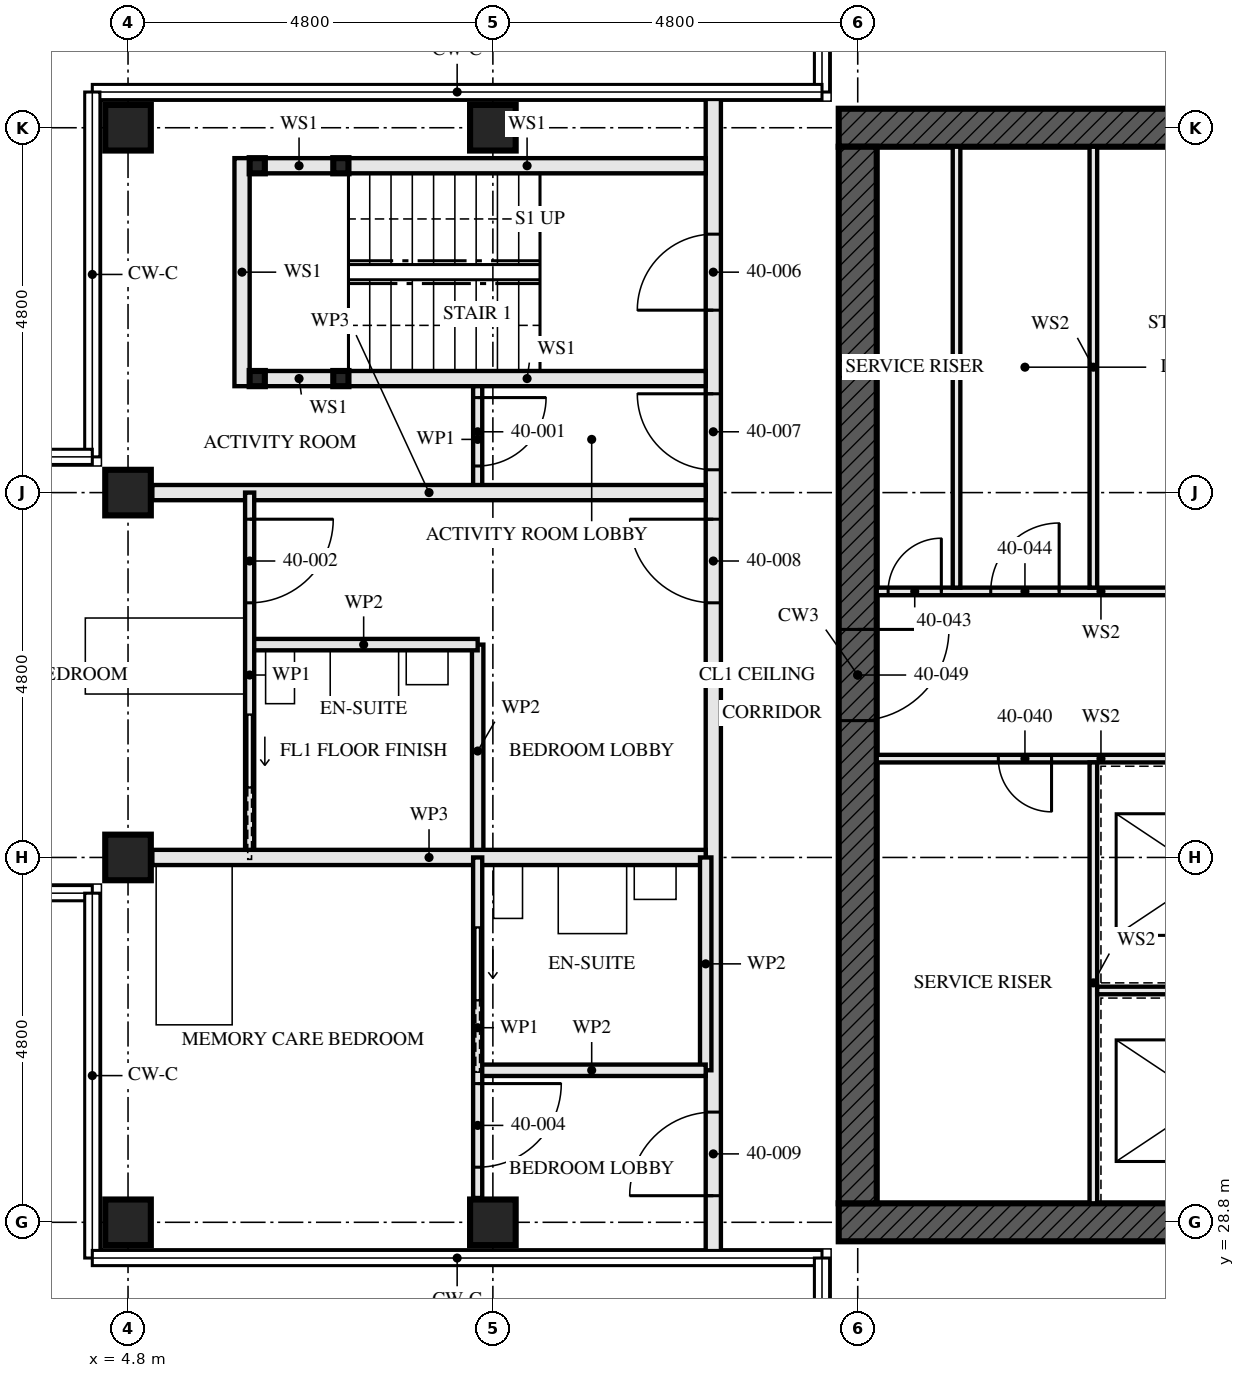
"""IFC4 building model, lengths in metres.
Left out: names, types, materials, properties, quantities, classifications, styles, units other than length and angle.
Written with IfcOpenShell. Run it as: python <this file> out.ifc"""

import sys

from ifc_helpers import new_model, si_unit, direction, frame, frame_2d, origin, origin_2d, place, context, subcontext, project, spatial, rectangle, hollow_rectangle, extrude, element, fill, save


model = new_model("IFC4")
c1 = context("Model", 3, precision=1e-05, world=origin(), true_north=direction((0.0, 1.0)))
c2 = subcontext(c1, "Body", "Model", "MODEL_VIEW")
j1 = project(units=[si_unit("LENGTHUNIT", "METRE"), si_unit("PLANEANGLEUNIT", "RADIAN")], contexts=[c1])
p1 = place(None, origin())
s1 = spatial("IfcSite", under=j1, at=p1, CompositionType="ELEMENT")
p2 = place(p1, origin())
s2 = spatial("IfcBuilding", under=s1, at=p2, CompositionType="ELEMENT")
p3 = place(p2, frame((0.0, 0.0, 148.0)))
s3 = spatial("IfcBuildingStorey", under=s2, at=p3, CompositionType="ELEMENT", Elevation=148.0)
for number, where, z_axis, x_axis in (
    (1, (4.8, 28.8, 0.0), (0.0, 0.0, 1.0), (0.0, 1.0, 0.0)),
    (2, (4.8, 33.6, 0.0), (0.0, 0.0, 1.0), (0.0, 1.0, 0.0)),
    (3, (4.8, 38.4, 0.0), (0.0, 0.0, 1.0), (0.0, 1.0, 0.0)),
    (4, (4.8, 43.2, 0.0), (0.0, 0.0, 1.0), (0.0, 1.0, 0.0)),
    (5, (9.6, 28.8, 0.0), (0.0, 0.0, 1.0), (0.0, 1.0, 0.0)),
    (6, (9.6, 43.2, 0.0), (0.0, 0.0, 1.0), (0.0, 1.0, 0.0)),
):
    element("IfcColumn", number, at=place(p3, frame(where, z_axis=z_axis, x_axis=x_axis)), inside=s3, PredefinedType="COLUMN", context=c2, shape_type="SweptSolid", body=[
        extrude(hollow_rectangle(XDim=0.6, YDim=0.6, WallThickness=0.08, at=origin_2d()), origin(), (0.0, 0.0, 1.0), 3.5),
    ])
p4 = place(p3, frame((14.15, 28.8, -0.17), z_axis=(0.0, 0.0, 1.0), x_axis=(1.0, 0.0, 0.0)))
e7 = element("IfcWall", 7, at=p4, inside=s3, PredefinedType="SHEAR", context=c2, shape_type="SweptSolid", body=[
    extrude(rectangle(XDim=14.9, YDim=0.5, at=frame_2d((7.45, 0.0))), origin(), (0.0, 0.0, 1.0), 3.5),
])
p5 = place(p4, frame((6.85, 0.0, 0.17)))
e8 = element("IfcOpeningElement", 8, at=p5, cuts=e7, PredefinedType="OPENING", context=c2, shape_type="SweptSolid", body=[
    extrude(rectangle(XDim=1.2, YDim=2.1, at=frame_2d((0.6, 1.05))), frame((0.0, 0.26, 0.0), z_axis=(0.0, -1.0, 0.0), x_axis=(1.0, 0.0, 0.0)), (0.0, 0.0, 1.0), 0.521),
])
p6 = place(p3, frame((29.05, 43.2, -0.17), z_axis=(0.0, 0.0, 1.0), x_axis=(-1.0, 0.0, 0.0)))
e9 = element("IfcWall", 9, at=p6, inside=s3, PredefinedType="SHEAR", context=c2, shape_type="SweptSolid", body=[
    extrude(rectangle(XDim=14.9, YDim=0.5, at=frame_2d((7.45, 0.0))), origin(), (0.0, 0.0, 1.0), 3.5),
])
p7 = place(p6, frame((6.85, 0.0, 0.17)))
e10 = element("IfcOpeningElement", 10, at=p7, cuts=e9, PredefinedType="OPENING", context=c2, shape_type="SweptSolid", body=[
    extrude(rectangle(XDim=1.2, YDim=2.1, at=frame_2d((0.6, 1.05))), frame((0.0, 0.26, 0.0), z_axis=(0.0, -1.0, 0.0), x_axis=(1.0, 0.0, 0.0)), (0.0, 0.0, 1.0), 0.521),
])
p8 = place(p3, frame((14.4, 42.95, -0.17), z_axis=(0.0, 0.0, 1.0), x_axis=(0.0, -1.0, 0.0)))
e11 = element("IfcWall", 11, at=p8, inside=s3, PredefinedType="SHEAR", context=c2, shape_type="SweptSolid", body=[
    extrude(rectangle(XDim=13.9, YDim=0.5, at=frame_2d((6.95, 0.0))), origin(), (0.0, 0.0, 1.0), 3.5),
])
p9 = place(p8, frame((6.35, 0.0, 0.17)))
e12 = element("IfcOpeningElement", 12, at=p9, cuts=e11, PredefinedType="OPENING", context=c2, shape_type="SweptSolid", body=[
    extrude(rectangle(XDim=1.2, YDim=2.1, at=frame_2d((0.6, 1.05))), frame((0.0, 0.26, 0.0), z_axis=(0.0, -1.0, 0.0), x_axis=(1.0, 0.0, 0.0)), (0.0, 0.0, 1.0), 0.521),
])
for number, where, z_axis, x_axis in (
    (13, (6.5, 42.7, 0.0), (0.0, 0.0, 1.0), (1.0, 0.0, 0.0)),
    (14, (6.5, 39.9, 0.0), (0.0, 0.0, 1.0), (1.0, 0.0, 0.0)),
    (15, (7.6, 42.7, 0.0), (0.0, 0.0, 1.0), (1.0, 0.0, 0.0)),
    (16, (7.6, 39.9, 0.0), (0.0, 0.0, 1.0), (1.0, 0.0, 0.0)),
):
    element("IfcColumn", number, at=place(p3, frame(where, z_axis=z_axis, x_axis=x_axis)), inside=s3, PredefinedType="COLUMN", context=c2, shape_type="SweptSolid", body=[
        extrude(hollow_rectangle(XDim=0.2, YDim=0.2, WallThickness=0.008, at=origin_2d()), origin(), (0.0, 0.0, 1.0), 3.33),
    ])
p10 = place(p3, frame((6.6, 42.7, 0.0), z_axis=(0.0, 0.0, 1.0), x_axis=(1.0, 0.0, 0.0)))
e17 = element("IfcWall", 17, at=p10, inside=s3, PredefinedType="SOLIDWALL", context=c2, shape_type="SweptSolid", body=[
    extrude(rectangle(XDim=0.9, YDim=0.2, at=frame_2d((0.45, 0.0))), origin(), (0.0, 0.0, 1.0), 2.99),
])
p11 = place(p3, frame((7.7, 42.7, 0.0), z_axis=(0.0, 0.0, 1.0), x_axis=(1.0, 0.0, 0.0)))
e18 = element("IfcWall", 18, at=p11, inside=s3, PredefinedType="SOLIDWALL", context=c2, shape_type="SweptSolid", body=[
    extrude(rectangle(XDim=4.7, YDim=0.2, at=frame_2d((2.35, 0.0))), origin(), (0.0, 0.0, 1.0), 2.99),
])
p12 = place(p3, frame((6.6, 39.9, 0.0), z_axis=(0.0, 0.0, 1.0), x_axis=(1.0, 0.0, 0.0)))
e19 = element("IfcWall", 19, at=p12, inside=s3, PredefinedType="SOLIDWALL", context=c2, shape_type="SweptSolid", body=[
    extrude(rectangle(XDim=0.9, YDim=0.2, at=frame_2d((0.45, 0.0))), origin(), (0.0, 0.0, 1.0), 2.99),
])
p13 = place(p3, frame((7.7, 39.9, 0.0), z_axis=(0.0, 0.0, 1.0), x_axis=(1.0, 0.0, 0.0)))
e20 = element("IfcWall", 20, at=p13, inside=s3, PredefinedType="SOLIDWALL", context=c2, shape_type="SweptSolid", body=[
    extrude(rectangle(XDim=4.7, YDim=0.2, at=frame_2d((2.35, 0.0))), origin(), (0.0, 0.0, 1.0), 2.99),
])
p14 = place(p3, frame((6.3, 42.8, 0.0), z_axis=(0.0, 0.0, 1.0), x_axis=(0.0, -1.0, 0.0)))
e21 = element("IfcWall", 21, at=p14, inside=s3, PredefinedType="SOLIDWALL", context=c2, shape_type="SweptSolid", body=[
    extrude(rectangle(XDim=3.0, YDim=0.2, at=frame_2d((1.5, 0.0))), origin(), (0.0, 0.0, 1.0), 3.33),
])
p15 = place(p3, frame((9.4, 39.8, 0.0), z_axis=(0.0, 0.0, 1.0), x_axis=(0.0, -1.0, 0.0)))
e22 = element("IfcWall", 22, at=p15, inside=s3, PredefinedType="PARTITIONING", context=c2, shape_type="SweptSolid", body=[
    extrude(rectangle(XDim=1.4, YDim=0.12, at=frame_2d((0.7, 0.0))), origin(), (0.0, 0.0, 1.0), 3.33),
])
p16 = place(p15, frame((0.15, 0.0, 0.0)))
e23 = element("IfcOpeningElement", 23, at=p16, cuts=e22, PredefinedType="OPENING", context=c2, shape_type="SweptSolid", body=[
    extrude(rectangle(XDim=0.9, YDim=2.1, at=frame_2d((0.45, 1.05))), frame((0.0, 0.071, 0.0), z_axis=(0.0, -1.0, 0.0), x_axis=(1.0, 0.0, 0.0)), (0.0, 0.0, 1.0), 0.141),
])
p17 = place(p3, frame((5.12, 38.4, 0.0), z_axis=(0.0, 0.0, 1.0), x_axis=(1.0, 0.0, 0.0)))
e24 = element("IfcWall", 24, at=p17, inside=s3, PredefinedType="PARTITIONING", context=c2, shape_type="SweptSolid", body=[
    extrude(rectangle(XDim=7.28, YDim=0.2, at=frame_2d((3.64, 0.0))), origin(), (0.0, 0.0, 1.0), 2.55),
])
p18 = place(p3, frame((6.4, 36.4, 0.0), z_axis=(0.0, 0.0, 1.0), x_axis=(1.0, 0.0, 0.0)))
e25 = element("IfcWall", 25, at=p18, inside=s3, PredefinedType="PARTITIONING", context=c2, shape_type="SweptSolid", body=[
    extrude(rectangle(XDim=3.0, YDim=0.15, at=frame_2d((1.5, 0.0))), origin(), (0.0, 0.0, 1.0), 3.33),
])
p19 = place(p3, frame((9.4, 36.4, 0.0), z_axis=(0.0, 0.0, 1.0), x_axis=(0.0, -1.0, 0.0)))
e26 = element("IfcWall", 26, at=p19, inside=s3, PredefinedType="PARTITIONING", context=c2, shape_type="SweptSolid", body=[
    extrude(rectangle(XDim=2.8, YDim=0.15, at=frame_2d((1.4, 0.0))), origin(), (0.0, 0.0, 1.0), 3.33),
])
p20 = place(p3, frame((6.4, 38.4, 0.0), z_axis=(0.0, 0.0, 1.0), x_axis=(0.0, -1.0, 0.0)))
e27 = element("IfcWall", 27, at=p20, inside=s3, PredefinedType="PARTITIONING", context=c2, shape_type="SweptSolid", body=[
    extrude(rectangle(XDim=4.8, YDim=0.12, at=frame_2d((2.4, 0.0))), origin(), (0.0, 0.0, 1.0), 3.33),
])
p21 = place(p20, frame((0.35, 0.0, 0.0)))
e28 = element("IfcOpeningElement", 28, at=p21, cuts=e27, PredefinedType="OPENING", context=c2, shape_type="SweptSolid", body=[
    extrude(rectangle(XDim=1.1, YDim=2.1, at=frame_2d((0.55, 1.05))), frame((0.0, 0.071, 0.0), z_axis=(0.0, -1.0, 0.0), x_axis=(1.0, 0.0, 0.0)), (0.0, 0.0, 1.0), 0.141),
])
p22 = place(p20, frame((2.925, 0.0, 0.0)))
e29 = element("IfcOpeningElement", 29, at=p22, cuts=e27, PredefinedType="OPENING", context=c2, shape_type="SweptSolid", body=[
    extrude(rectangle(XDim=0.95, YDim=2.1, at=frame_2d((0.475, 1.05))), frame((0.0, 0.071, 0.0), z_axis=(0.0, -1.0, 0.0), x_axis=(1.0, 0.0, 0.0)), (0.0, 0.0, 1.0), 0.141),
])
p23 = place(p3, frame((5.12, 33.6, 0.0), z_axis=(0.0, 0.0, 1.0), x_axis=(1.0, 0.0, 0.0)))
e30 = element("IfcWall", 30, at=p23, inside=s3, PredefinedType="PARTITIONING", context=c2, shape_type="SweptSolid", body=[
    extrude(rectangle(XDim=7.28, YDim=0.2, at=frame_2d((3.64, 0.0))), origin(), (0.0, 0.0, 1.0), 2.55),
])
p24 = place(p3, frame((9.4, 30.8, 0.0), z_axis=(0.0, 0.0, 1.0), x_axis=(1.0, 0.0, 0.0)))
e31 = element("IfcWall", 31, at=p24, inside=s3, PredefinedType="PARTITIONING", context=c2, shape_type="SweptSolid", body=[
    extrude(rectangle(XDim=3.0, YDim=0.15, at=frame_2d((1.5, 0.0))), origin(), (0.0, 0.0, 1.0), 3.33),
])
p25 = place(p3, frame((12.4, 33.6, 0.0), z_axis=(0.0, 0.0, 1.0), x_axis=(0.0, -1.0, 0.0)))
e32 = element("IfcWall", 32, at=p25, inside=s3, PredefinedType="PARTITIONING", context=c2, shape_type="SweptSolid", body=[
    extrude(rectangle(XDim=2.8, YDim=0.15, at=frame_2d((1.4, 0.0))), origin(), (0.0, 0.0, 1.0), 3.33),
])
p26 = place(p3, frame((9.4, 33.6, 0.0), z_axis=(0.0, 0.0, 1.0), x_axis=(0.0, -1.0, 0.0)))
e33 = element("IfcWall", 33, at=p26, inside=s3, PredefinedType="PARTITIONING", context=c2, shape_type="SweptSolid", body=[
    extrude(rectangle(XDim=4.48, YDim=0.12, at=frame_2d((2.24, 0.0))), origin(), (0.0, 0.0, 1.0), 3.33),
])
p27 = place(p26, frame((2.975, 0.0, 0.0)))
e34 = element("IfcOpeningElement", 34, at=p27, cuts=e33, PredefinedType="OPENING", context=c2, shape_type="SweptSolid", body=[
    extrude(rectangle(XDim=1.1, YDim=2.1, at=frame_2d((0.55, 1.05))), frame((0.0, 0.071, 0.0), z_axis=(0.0, -1.0, 0.0), x_axis=(1.0, 0.0, 0.0)), (0.0, 0.0, 1.0), 0.141),
])
p28 = place(p26, frame((0.925, 0.0, 0.0)))
e35 = element("IfcOpeningElement", 35, at=p28, cuts=e33, PredefinedType="OPENING", context=c2, shape_type="SweptSolid", body=[
    extrude(rectangle(XDim=0.95, YDim=2.1, at=frame_2d((0.475, 1.05))), frame((0.0, 0.071, 0.0), z_axis=(0.0, -1.0, 0.0), x_axis=(1.0, 0.0, 0.0)), (0.0, 0.0, 1.0), 0.141),
])
p29 = place(p3, frame((12.5, 43.65, 0.0), z_axis=(0.0, 0.0, 1.0), x_axis=(0.0, -1.0, 0.0)))
e36 = element("IfcWall", 36, at=p29, inside=s3, PredefinedType="PARTITIONING", context=c2, shape_type="SweptSolid", body=[
    extrude(rectangle(XDim=15.3, YDim=0.2, at=frame_2d((7.65, 0.0))), origin(), (0.0, 0.0, 1.0), 2.32),
])
p30 = place(p29, frame((1.85, 0.0, 0.0)))
e37 = element("IfcOpeningElement", 37, at=p30, cuts=e36, PredefinedType="OPENING", context=c2, shape_type="SweptSolid", body=[
    extrude(rectangle(XDim=1.0, YDim=2.1, at=frame_2d((0.5, 1.05))), frame((0.0, 0.111, 0.0), z_axis=(0.0, -1.0, 0.0), x_axis=(1.0, 0.0, 0.0)), (0.0, 0.0, 1.0), 0.221),
])
p31 = place(p29, frame((3.95, 0.0, 0.0)))
e38 = element("IfcOpeningElement", 38, at=p31, cuts=e36, PredefinedType="OPENING", context=c2, shape_type="SweptSolid", body=[
    extrude(rectangle(XDim=1.0, YDim=2.1, at=frame_2d((0.5, 1.05))), frame((0.0, 0.111, 0.0), z_axis=(0.0, -1.0, 0.0), x_axis=(1.0, 0.0, 0.0)), (0.0, 0.0, 1.0), 0.221),
])
p32 = place(p29, frame((5.6, 0.0, 0.0)))
e39 = element("IfcOpeningElement", 39, at=p32, cuts=e36, PredefinedType="OPENING", context=c2, shape_type="SweptSolid", body=[
    extrude(rectangle(XDim=1.1, YDim=2.1, at=frame_2d((0.55, 1.05))), frame((0.0, 0.111, 0.0), z_axis=(0.0, -1.0, 0.0), x_axis=(1.0, 0.0, 0.0)), (0.0, 0.0, 1.0), 0.221),
])
p33 = place(p29, frame((13.4, 0.0, 0.0)))
e40 = element("IfcOpeningElement", 40, at=p33, cuts=e36, PredefinedType="OPENING", context=c2, shape_type="SweptSolid", body=[
    extrude(rectangle(XDim=1.1, YDim=2.1, at=frame_2d((0.55, 1.05))), frame((0.0, 0.111, 0.0), z_axis=(0.0, -1.0, 0.0), x_axis=(1.0, 0.0, 0.0)), (0.0, 0.0, 1.0), 0.221),
])
p34 = place(p3, frame((15.7, 37.15, 0.0), z_axis=(0.0, 0.0, 1.0), x_axis=(0.0, 1.0, 0.0)))
e41 = element("IfcWall", 41, at=p34, inside=s3, PredefinedType="SOLIDWALL", context=c2, shape_type="SweptSolid", body=[
    extrude(rectangle(XDim=5.8, YDim=0.1, at=frame_2d((2.9, 0.0))), origin(), (0.0, 0.0, 1.0), 3.33),
])
p35 = place(p3, frame((14.65, 34.9, 0.0), z_axis=(0.0, 0.0, 1.0), x_axis=(1.0, 0.0, 0.0)))
e42 = element("IfcWall", 42, at=p35, inside=s3, PredefinedType="SOLIDWALL", context=c2, shape_type="SweptSolid", body=[
    extrude(rectangle(XDim=5.9, YDim=0.1, at=frame_2d((2.95, 0.0))), origin(), (0.0, 0.0, 1.0), 3.33),
])
p36 = place(p35, frame((1.6, 0.0, 0.0)))
e43 = element("IfcOpeningElement", 43, at=p36, cuts=e42, PredefinedType="OPENING", context=c2, shape_type="SweptSolid", body=[
    extrude(rectangle(XDim=0.7, YDim=2.1, at=frame_2d((0.35, 1.05))), frame((0.0, 0.061, 0.0), z_axis=(0.0, -1.0, 0.0), x_axis=(1.0, 0.0, 0.0)), (0.0, 0.0, 1.0), 0.121),
])
p37 = place(p3, frame((14.65, 37.1, 0.0), z_axis=(0.0, 0.0, 1.0), x_axis=(1.0, 0.0, 0.0)))
e44 = element("IfcWall", 44, at=p37, inside=s3, PredefinedType="SOLIDWALL", context=c2, shape_type="SweptSolid", body=[
    extrude(rectangle(XDim=5.9, YDim=0.1, at=frame_2d((2.95, 0.0))), origin(), (0.0, 0.0, 1.0), 3.33),
])
p38 = place(p37, frame((0.15, 0.0, 0.0)))
e45 = element("IfcOpeningElement", 45, at=p38, cuts=e44, PredefinedType="OPENING", context=c2, shape_type="SweptSolid", body=[
    extrude(rectangle(XDim=0.7, YDim=2.1, at=frame_2d((0.35, 1.05))), frame((0.0, 0.061, 0.0), z_axis=(0.0, -1.0, 0.0), x_axis=(1.0, 0.0, 0.0)), (0.0, 0.0, 1.0), 0.121),
])
p39 = place(p37, frame((1.5, 0.0, 0.0)))
e46 = element("IfcOpeningElement", 46, at=p39, cuts=e44, PredefinedType="OPENING", context=c2, shape_type="SweptSolid", body=[
    extrude(rectangle(XDim=0.9, YDim=2.1, at=frame_2d((0.45, 1.05))), frame((0.0, 0.061, 0.0), z_axis=(0.0, -1.0, 0.0), x_axis=(1.0, 0.0, 0.0)), (0.0, 0.0, 1.0), 0.121),
])
p40 = place(p3, frame((17.5, 29.05, 0.0), z_axis=(0.0, 0.0, 1.0), x_axis=(0.0, 1.0, 0.0)))
e47 = element("IfcWall", 47, at=p40, inside=s3, PredefinedType="SOLIDWALL", context=c2, shape_type="SweptSolid", body=[
    extrude(rectangle(XDim=5.8, YDim=0.1, at=frame_2d((2.9, 0.0))), origin(), (0.0, 0.0, 1.0), 3.33),
])
p41 = place(p3, frame((17.55, 31.85, 0.0), z_axis=(0.0, 0.0, 1.0), x_axis=(1.0, 0.0, 0.0)))
e48 = element("IfcWall", 48, at=p41, inside=s3, PredefinedType="SOLIDWALL", context=c2, shape_type="SweptSolid", body=[
    extrude(rectangle(XDim=2.9, YDim=0.1, at=frame_2d((1.45, 0.0))), origin(), (0.0, 0.0, 1.0), 3.33),
])
p42 = place(p3, frame((17.5, 37.15, 0.0), z_axis=(0.0, 0.0, 1.0), x_axis=(0.0, 1.0, 0.0)))
e49 = element("IfcWall", 49, at=p42, inside=s3, PredefinedType="SOLIDWALL", context=c2, shape_type="SweptSolid", body=[
    extrude(rectangle(XDim=5.8, YDim=0.1, at=frame_2d((2.9, 0.0))), origin(), (0.0, 0.0, 1.0), 3.33),
])
p43 = place(p16, origin())
e50 = element("IfcDoor", 50, at=p43, inside=s3, OperationType="SINGLE_SWING_RIGHT", PredefinedType="DOOR", context=c2, shape_type="SweptSolid", body=[
    extrude(rectangle(XDim=0.9, YDim=2.1, at=frame_2d((0.45, 1.05))), frame((0.0, 0.022, 0.0), z_axis=(0.0, -1.0, 0.0), x_axis=(1.0, 0.0, 0.0)), (0.0, 0.0, 1.0), 0.044),
])
fill(e23, e50)
p44 = place(p21, origin())
e51 = element("IfcDoor", 51, at=p44, inside=s3, OperationType="SINGLE_SWING_RIGHT", PredefinedType="DOOR", context=c2, shape_type="SweptSolid", body=[
    extrude(rectangle(XDim=1.1, YDim=2.1, at=frame_2d((0.55, 1.05))), frame((0.0, 0.022, 0.0), z_axis=(0.0, -1.0, 0.0), x_axis=(1.0, 0.0, 0.0)), (0.0, 0.0, 1.0), 0.044),
])
fill(e28, e51)
p45 = place(p22, origin())
e52 = element("IfcDoor", 52, at=p45, inside=s3, OperationType="SLIDING_TO_LEFT", PredefinedType="DOOR", context=c2, shape_type="SweptSolid", body=[
    extrude(rectangle(XDim=0.95, YDim=2.1, at=frame_2d((0.475, 1.05))), frame((0.0, 0.022, 0.0), z_axis=(0.0, -1.0, 0.0), x_axis=(1.0, 0.0, 0.0)), (0.0, 0.0, 1.0), 0.044),
])
fill(e29, e52)
p46 = place(p27, origin())
e53 = element("IfcDoor", 53, at=p46, inside=s3, OperationType="SINGLE_SWING_RIGHT", PredefinedType="DOOR", context=c2, shape_type="SweptSolid", body=[
    extrude(rectangle(XDim=1.1, YDim=2.1, at=frame_2d((0.55, 1.05))), frame((0.0, 0.022, 0.0), z_axis=(0.0, -1.0, 0.0), x_axis=(1.0, 0.0, 0.0)), (0.0, 0.0, 1.0), 0.044),
])
fill(e34, e53)
p47 = place(p28, origin())
e54 = element("IfcDoor", 54, at=p47, inside=s3, OperationType="SLIDING_TO_LEFT", PredefinedType="DOOR", context=c2, shape_type="SweptSolid", body=[
    extrude(rectangle(XDim=0.95, YDim=2.1, at=frame_2d((0.475, 1.05))), frame((0.0, 0.022, 0.0), z_axis=(0.0, -1.0, 0.0), x_axis=(1.0, 0.0, 0.0)), (0.0, 0.0, 1.0), 0.044),
])
fill(e35, e54)
p48 = place(p30, frame((1.0, 0.0, 0.0), z_axis=(0.0, 0.0, 1.0), x_axis=(-1.0, 0.0, 0.0)))
e55 = element("IfcDoor", 55, at=p48, inside=s3, OperationType="SINGLE_SWING_RIGHT", PredefinedType="DOOR", context=c2, shape_type="SweptSolid", body=[
    extrude(rectangle(XDim=1.0, YDim=2.1, at=frame_2d((0.5, 1.05))), frame((0.0, 0.032, 0.0), z_axis=(0.0, -1.0, 0.0), x_axis=(1.0, 0.0, 0.0)), (0.0, 0.0, 1.0), 0.064),
])
fill(e37, e55)
p49 = place(p31, frame((1.0, 0.0, 0.0), z_axis=(0.0, 0.0, 1.0), x_axis=(-1.0, 0.0, 0.0)))
e56 = element("IfcDoor", 56, at=p49, inside=s3, OperationType="SINGLE_SWING_LEFT", PredefinedType="DOOR", context=c2, shape_type="SweptSolid", body=[
    extrude(rectangle(XDim=1.0, YDim=2.1, at=frame_2d((0.5, 1.05))), frame((0.0, 0.027, 0.0), z_axis=(0.0, -1.0, 0.0), x_axis=(1.0, 0.0, 0.0)), (0.0, 0.0, 1.0), 0.054),
])
fill(e38, e56)
p50 = place(p32, frame((1.1, 0.0, 0.0), z_axis=(0.0, 0.0, 1.0), x_axis=(-1.0, 0.0, 0.0)))
e57 = element("IfcDoor", 57, at=p50, inside=s3, OperationType="SINGLE_SWING_LEFT", PredefinedType="DOOR", context=c2, shape_type="SweptSolid", body=[
    extrude(rectangle(XDim=1.1, YDim=2.1, at=frame_2d((0.55, 1.05))), frame((0.0, 0.027, 0.0), z_axis=(0.0, -1.0, 0.0), x_axis=(1.0, 0.0, 0.0)), (0.0, 0.0, 1.0), 0.054),
])
fill(e39, e57)
p51 = place(p33, frame((1.1, 0.0, 0.0), z_axis=(0.0, 0.0, 1.0), x_axis=(-1.0, 0.0, 0.0)))
e58 = element("IfcDoor", 58, at=p51, inside=s3, OperationType="SINGLE_SWING_RIGHT", PredefinedType="DOOR", context=c2, shape_type="SweptSolid", body=[
    extrude(rectangle(XDim=1.1, YDim=2.1, at=frame_2d((0.55, 1.05))), frame((0.0, 0.027, 0.0), z_axis=(0.0, -1.0, 0.0), x_axis=(1.0, 0.0, 0.0)), (0.0, 0.0, 1.0), 0.054),
])
fill(e40, e58)
p52 = place(p36, frame((0.7, 0.0, 0.0), z_axis=(0.0, 0.0, 1.0), x_axis=(-1.0, 0.0, 0.0)))
e59 = element("IfcDoor", 59, at=p52, inside=s3, OperationType="SINGLE_SWING_RIGHT", PredefinedType="DOOR", context=c2, shape_type="SweptSolid", body=[
    extrude(rectangle(XDim=0.7, YDim=2.1, at=frame_2d((0.35, 1.05))), frame((0.0, 0.027, 0.0), z_axis=(0.0, -1.0, 0.0), x_axis=(1.0, 0.0, 0.0)), (0.0, 0.0, 1.0), 0.054),
])
fill(e43, e59)
p53 = place(p38, origin())
e60 = element("IfcDoor", 60, at=p53, inside=s3, OperationType="SINGLE_SWING_LEFT", PredefinedType="DOOR", context=c2, shape_type="SweptSolid", body=[
    extrude(rectangle(XDim=0.7, YDim=2.1, at=frame_2d((0.35, 1.05))), frame((0.0, 0.027, 0.0), z_axis=(0.0, -1.0, 0.0), x_axis=(1.0, 0.0, 0.0)), (0.0, 0.0, 1.0), 0.054),
])
fill(e45, e60)
p54 = place(p39, origin())
e61 = element("IfcDoor", 61, at=p54, inside=s3, OperationType="SINGLE_SWING_LEFT", PredefinedType="DOOR", context=c2, shape_type="SweptSolid", body=[
    extrude(rectangle(XDim=0.9, YDim=2.1, at=frame_2d((0.45, 1.05))), frame((0.0, 0.027, 0.0), z_axis=(0.0, -1.0, 0.0), x_axis=(1.0, 0.0, 0.0)), (0.0, 0.0, 1.0), 0.054),
])
fill(e46, e61)
p55 = place(p9, origin())
e62 = element("IfcDoor", 62, at=p55, inside=s3, OperationType="SINGLE_SWING_LEFT", PredefinedType="DOOR", context=c2, shape_type="SweptSolid", body=[
    extrude(rectangle(XDim=1.2, YDim=2.1, at=frame_2d((0.6, 1.05))), frame((0.0, 0.027, 0.0), z_axis=(0.0, -1.0, 0.0), x_axis=(1.0, 0.0, 0.0)), (0.0, 0.0, 1.0), 0.054),
])
fill(e12, e62)
save(model, sys.argv[1])
